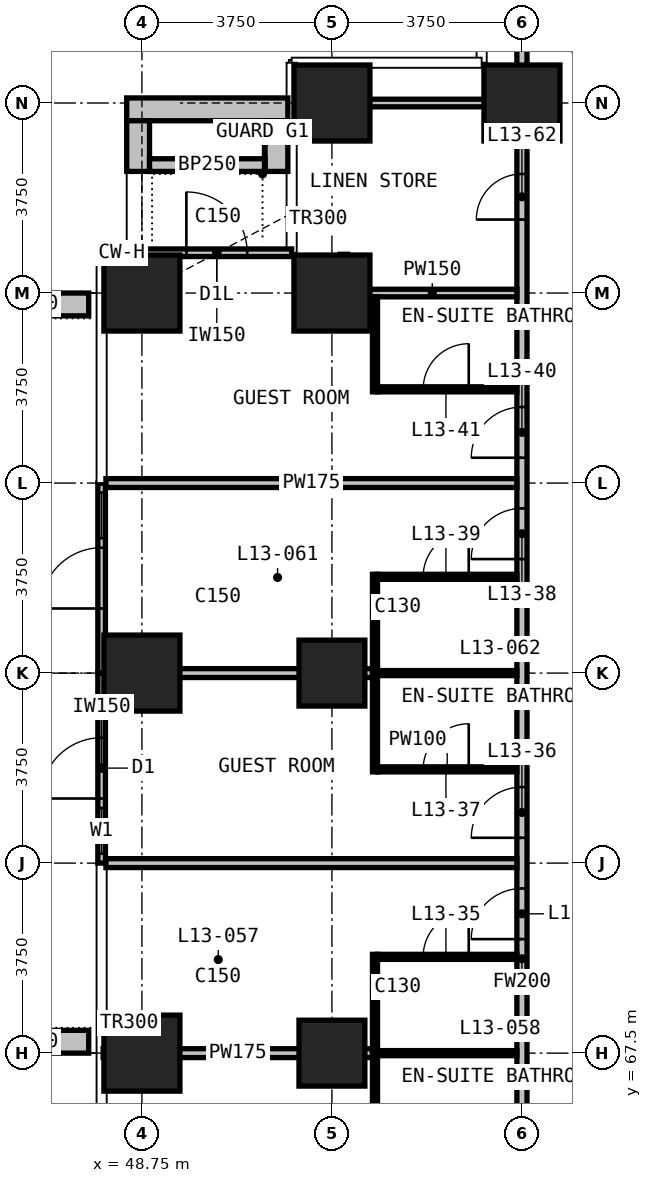
"""IFC4 building model, lengths in metres.
Left out: names, types, materials, properties, quantities, classifications, styles, units other than length and angle.
Written with IfcOpenShell. Run it as: python <this file> out.ifc"""

import sys

from ifc_helpers import new_model, si_unit, direction, frame, frame_2d, origin, origin_2d, place, context, subcontext, project, spatial, rectangle, extrude, element, fill, save


model = new_model("IFC4")
c1 = context("Model", 3, precision=1e-05, world=origin(), true_north=direction((0.0, 1.0)))
c2 = subcontext(c1, "Body", "Model", "MODEL_VIEW")
j1 = project(units=[si_unit("LENGTHUNIT", "METRE"), si_unit("PLANEANGLEUNIT", "RADIAN")], contexts=[c1])
p1 = place(None, origin())
s1 = spatial("IfcSite", under=j1, at=p1, CompositionType="ELEMENT")
p2 = place(p1, origin())
s2 = spatial("IfcBuilding", under=s1, at=p2, CompositionType="ELEMENT")
p3 = place(p2, frame((0.0, 0.0, 62.6)))
s3 = spatial("IfcBuildingStorey", under=s2, at=p3, CompositionType="ELEMENT", Elevation=62.6)
for number, where, z_axis, x_axis in (
    (1, (48.75, 67.5, 0.0), (0.0, 0.0, 1.0), (1.0, 0.0, 0.0)),
    (2, (48.75, 75.0, 0.0), (0.0, 0.0, 1.0), (1.0, 0.0, 0.0)),
    (3, (48.75, 82.5, 0.0), (0.0, 0.0, 1.0), (1.0, 0.0, 0.0)),
):
    element("IfcColumn", number, at=place(p3, frame(where, z_axis=z_axis, x_axis=x_axis)), inside=s3, PredefinedType="COLUMN", context=c2, shape_type="SweptSolid", body=[
        extrude(rectangle(XDim=1.5, YDim=1.5, at=origin_2d()), origin(), (0.0, 0.0, 1.0), 3.3),
    ])
for number, where, z_axis, x_axis in (
    (4, (52.5, 67.5, 0.0), (0.0, 0.0, 1.0), (1.0, 0.0, 0.0)),
    (5, (52.5, 75.0, 0.0), (0.0, 0.0, 1.0), (1.0, 0.0, 0.0)),
):
    element("IfcColumn", number, at=place(p3, frame(where, z_axis=z_axis, x_axis=x_axis)), inside=s3, PredefinedType="COLUMN", context=c2, shape_type="SweptSolid", body=[
        extrude(rectangle(XDim=1.3, YDim=1.3, at=origin_2d()), origin(), (0.0, 0.0, 1.0), 3.3),
    ])
for number, where, z_axis, x_axis in (
    (6, (52.5, 82.5, 0.0), (0.0, 0.0, 1.0), (1.0, 0.0, 0.0)),
    (7, (52.5, 86.25, 0.0), (0.0, 0.0, 1.0), (1.0, 0.0, 0.0)),
    (8, (56.25, 86.25, 0.0), (0.0, 0.0, 1.0), (1.0, 0.0, 0.0)),
):
    element("IfcColumn", number, at=place(p3, frame(where, z_axis=z_axis, x_axis=x_axis)), inside=s3, PredefinedType="COLUMN", context=c2, shape_type="SweptSolid", body=[
        extrude(rectangle(XDim=1.5, YDim=1.5, at=origin_2d()), origin(), (0.0, 0.0, 1.0), 3.3),
    ])
p4 = place(p3, frame((48.75, 83.295, 0.0), z_axis=(0.0, 0.0, 1.0), x_axis=(1.0, 0.0, 0.0)))
e9 = element("IfcWall", 9, at=p4, inside=s3, PredefinedType="SOLIDWALL", context=c2, shape_type="SweptSolid", body=[
    extrude(rectangle(XDim=2.955, YDim=0.15, at=frame_2d((1.478, 0.0))), origin(), (0.0, 0.0, 1.0), 3.0),
])
p5 = place(p4, frame((0.877, 0.0, 0.0)))
e10 = element("IfcOpeningElement", 10, at=p5, cuts=e9, PredefinedType="OPENING", context=c2, shape_type="SweptSolid", body=[
    extrude(rectangle(XDim=1.2, YDim=2.0, at=frame_2d((0.6, 1.0))), frame((0.0, 0.085, 0.0), z_axis=(0.0, -1.0, 0.0), x_axis=(1.0, 0.0, 0.0)), (0.0, 0.0, 1.0), 0.17),
])
p6 = place(p3, frame((47.955, 71.25, 0.0), z_axis=(0.0, 0.0, 1.0), x_axis=(0.0, 1.0, 0.0)))
e11 = element("IfcWall", 11, at=p6, inside=s3, PredefinedType="SOLIDWALL", context=c2, shape_type="SweptSolid", body=[
    extrude(rectangle(XDim=3.75, YDim=0.15, at=frame_2d((1.875, 0.0))), origin(), (0.0, 0.0, 1.0), 3.0),
])
p7 = place(p6, frame((0.188, 0.0, 0.1)))
e12 = element("IfcOpeningElement", 12, at=p7, cuts=e11, PredefinedType="OPENING", context=c2, shape_type="SweptSolid", body=[
    extrude(rectangle(XDim=0.9, YDim=2.4, at=frame_2d((0.45, 1.2))), frame((0.0, 0.085, 0.0), z_axis=(0.0, -1.0, 0.0), x_axis=(1.0, 0.0, 0.0)), (0.0, 0.0, 1.0), 0.17),
])
p8 = place(p6, frame((1.275, 0.0, 0.0)))
e13 = element("IfcOpeningElement", 13, at=p8, cuts=e11, PredefinedType="OPENING", context=c2, shape_type="SweptSolid", body=[
    extrude(rectangle(XDim=1.2, YDim=2.4, at=frame_2d((0.6, 1.2))), frame((0.0, 0.085, 0.0), z_axis=(0.0, -1.0, 0.0), x_axis=(1.0, 0.0, 0.0)), (0.0, 0.0, 1.0), 0.17),
])
p9 = place(p3, frame((47.955, 75.0, 0.0), z_axis=(0.0, 0.0, 1.0), x_axis=(0.0, 1.0, 0.0)))
e14 = element("IfcWall", 14, at=p9, inside=s3, PredefinedType="SOLIDWALL", context=c2, shape_type="SweptSolid", body=[
    extrude(rectangle(XDim=3.75, YDim=0.15, at=frame_2d((1.875, 0.0))), origin(), (0.0, 0.0, 1.0), 3.0),
])
p10 = place(p9, frame((1.275, 0.0, 0.0)))
e15 = element("IfcOpeningElement", 15, at=p10, cuts=e14, PredefinedType="OPENING", context=c2, shape_type="SweptSolid", body=[
    extrude(rectangle(XDim=1.2, YDim=2.4, at=frame_2d((0.6, 1.2))), frame((0.0, 0.085, 0.0), z_axis=(0.0, -1.0, 0.0), x_axis=(1.0, 0.0, 0.0)), (0.0, 0.0, 1.0), 0.17),
])
p11 = place(p9, frame((2.663, 0.0, 0.1)))
e16 = element("IfcOpeningElement", 16, at=p11, cuts=e14, PredefinedType="OPENING", context=c2, shape_type="SweptSolid", body=[
    extrude(rectangle(XDim=0.9, YDim=2.4, at=frame_2d((0.45, 1.2))), frame((0.0, 0.085, 0.0), z_axis=(0.0, -1.0, 0.0), x_axis=(1.0, 0.0, 0.0)), (0.0, 0.0, 1.0), 0.17),
])
p12 = place(p3, frame((48.45, 86.125, 0.0), z_axis=(0.0, 0.0, 1.0), x_axis=(1.0, 0.0, 0.0)))
e17 = element("IfcWall", 17, at=p12, inside=s3, PredefinedType="USERDEFINED", context=c2, shape_type="SweptSolid", body=[
    extrude(rectangle(XDim=3.18, YDim=0.45, at=frame_2d((1.59, 0.0))), origin(), (0.0, 0.0, 1.0), 1.1),
])
for number, where, z_axis, x_axis in (
    (18, (48.675, 84.9, 0.0), (0.0, 0.0, 1.0), (0.0, 1.0, 0.0)),
    (19, (51.405, 84.9, 0.0), (0.0, 0.0, 1.0), (0.0, 1.0, 0.0)),
):
    element("IfcWall", number, at=place(p3, frame(where, z_axis=z_axis, x_axis=x_axis)), inside=s3, PredefinedType="USERDEFINED", context=c2, shape_type="SweptSolid", body=[
        extrude(rectangle(XDim=1.0, YDim=0.45, at=frame_2d((0.5, 0.0))), origin(), (0.0, 0.0, 1.0), 1.1),
    ])
p13 = place(p3, frame((48.9, 85.025, 0.0), z_axis=(0.0, 0.0, 1.0), x_axis=(1.0, 0.0, 0.0)))
e20 = element("IfcWall", 20, at=p13, inside=s3, PredefinedType="USERDEFINED", context=c2, shape_type="SweptSolid", body=[
    extrude(rectangle(XDim=2.28, YDim=0.25, at=frame_2d((1.14, 0.0))), origin(), (0.0, 0.0, 1.0), 1.0),
])
for number, where, z_axis, x_axis in (
    (21, (47.7, 67.725, 0.0), (0.0, 0.0, 1.0), (-1.0, 0.0, 0.0)),
    (22, (47.7, 82.275, 0.0), (0.0, 0.0, 1.0), (-1.0, 0.0, 0.0)),
):
    element("IfcWall", number, at=place(p3, frame(where, z_axis=z_axis, x_axis=x_axis)), inside=s3, PredefinedType="USERDEFINED", context=c2, shape_type="SweptSolid", body=[
        extrude(rectangle(XDim=2.35, YDim=0.45, at=frame_2d((1.175, 0.0))), origin(), (0.0, 0.0, 1.0), 1.1),
    ])
p14 = place(p3, frame((56.25, 52.4, 0.0), z_axis=(0.0, 0.0, 1.0), x_axis=(0.0, 1.0, 0.0)))
e23 = element("IfcWall", 23, at=p14, inside=s3, PredefinedType="PARTITIONING", context=c2, shape_type="SweptSolid", body=[
    extrude(rectangle(XDim=33.925, YDim=0.2, at=frame_2d((16.962, 0.0))), origin(), (0.0, 0.0, 1.0), 3.0),
])
p15 = place(p14, frame((2.35, 0.0, 0.0)))
e24 = element("IfcOpeningElement", 24, at=p15, cuts=e23, PredefinedType="OPENING", context=c2, shape_type="SweptSolid", body=[
    extrude(rectangle(XDim=1.0, YDim=2.2, at=frame_2d((0.5, 1.1))), frame((0.0, 0.11, 0.0), z_axis=(0.0, -1.0, 0.0), x_axis=(1.0, 0.0, 0.0)), (0.0, 0.0, 1.0), 0.22),
])
p16 = place(p14, frame((4.35, 0.0, 0.0)))
e25 = element("IfcOpeningElement", 25, at=p16, cuts=e23, PredefinedType="OPENING", context=c2, shape_type="SweptSolid", body=[
    extrude(rectangle(XDim=1.0, YDim=2.2, at=frame_2d((0.5, 1.1))), frame((0.0, 0.11, 0.0), z_axis=(0.0, -1.0, 0.0), x_axis=(1.0, 0.0, 0.0)), (0.0, 0.0, 1.0), 0.22),
])
p17 = place(p14, frame((9.85, 0.0, 0.0)))
e26 = element("IfcOpeningElement", 26, at=p17, cuts=e23, PredefinedType="OPENING", context=c2, shape_type="SweptSolid", body=[
    extrude(rectangle(XDim=1.0, YDim=2.2, at=frame_2d((0.5, 1.1))), frame((0.0, 0.11, 0.0), z_axis=(0.0, -1.0, 0.0), x_axis=(1.0, 0.0, 0.0)), (0.0, 0.0, 1.0), 0.22),
])
p18 = place(p14, frame((11.85, 0.0, 0.0)))
e27 = element("IfcOpeningElement", 27, at=p18, cuts=e23, PredefinedType="OPENING", context=c2, shape_type="SweptSolid", body=[
    extrude(rectangle(XDim=1.0, YDim=2.2, at=frame_2d((0.5, 1.1))), frame((0.0, 0.11, 0.0), z_axis=(0.0, -1.0, 0.0), x_axis=(1.0, 0.0, 0.0)), (0.0, 0.0, 1.0), 0.22),
])
p19 = place(p14, frame((17.35, 0.0, 0.0)))
e28 = element("IfcOpeningElement", 28, at=p19, cuts=e23, PredefinedType="OPENING", context=c2, shape_type="SweptSolid", body=[
    extrude(rectangle(XDim=1.0, YDim=2.2, at=frame_2d((0.5, 1.1))), frame((0.0, 0.11, 0.0), z_axis=(0.0, -1.0, 0.0), x_axis=(1.0, 0.0, 0.0)), (0.0, 0.0, 1.0), 0.22),
])
p20 = place(p14, frame((19.35, 0.0, 0.0)))
e29 = element("IfcOpeningElement", 29, at=p20, cuts=e23, PredefinedType="OPENING", context=c2, shape_type="SweptSolid", body=[
    extrude(rectangle(XDim=1.0, YDim=2.2, at=frame_2d((0.5, 1.1))), frame((0.0, 0.11, 0.0), z_axis=(0.0, -1.0, 0.0), x_axis=(1.0, 0.0, 0.0)), (0.0, 0.0, 1.0), 0.22),
])
p21 = place(p14, frame((24.85, 0.0, 0.0)))
e30 = element("IfcOpeningElement", 30, at=p21, cuts=e23, PredefinedType="OPENING", context=c2, shape_type="SweptSolid", body=[
    extrude(rectangle(XDim=1.0, YDim=2.2, at=frame_2d((0.5, 1.1))), frame((0.0, 0.11, 0.0), z_axis=(0.0, -1.0, 0.0), x_axis=(1.0, 0.0, 0.0)), (0.0, 0.0, 1.0), 0.22),
])
p22 = place(p14, frame((26.85, 0.0, 0.0)))
e31 = element("IfcOpeningElement", 31, at=p22, cuts=e23, PredefinedType="OPENING", context=c2, shape_type="SweptSolid", body=[
    extrude(rectangle(XDim=1.0, YDim=2.2, at=frame_2d((0.5, 1.1))), frame((0.0, 0.11, 0.0), z_axis=(0.0, -1.0, 0.0), x_axis=(1.0, 0.0, 0.0)), (0.0, 0.0, 1.0), 0.22),
])
p23 = place(p14, frame((31.55, 0.0, 0.0)))
e32 = element("IfcOpeningElement", 32, at=p23, cuts=e23, PredefinedType="OPENING", context=c2, shape_type="SweptSolid", body=[
    extrude(rectangle(XDim=0.9, YDim=2.2, at=frame_2d((0.45, 1.1))), frame((0.0, 0.11, 0.0), z_axis=(0.0, -1.0, 0.0), x_axis=(1.0, 0.0, 0.0)), (0.0, 0.0, 1.0), 0.22),
])
p24 = place(p3, frame((56.25, 86.28, 0.0), z_axis=(0.0, 0.0, 1.0), x_axis=(0.0, 1.0, 0.0)))
e33 = element("IfcWall", 33, at=p24, inside=s3, PredefinedType="PARTITIONING", context=c2, shape_type="SweptSolid", body=[
    extrude(rectangle(XDim=4.365, YDim=0.2, at=frame_2d((2.183, 0.0))), origin(), (0.0, 0.0, 1.0), 3.0),
])
p25 = place(p3, frame((47.985, 67.5, 0.0), z_axis=(0.0, 0.0, 1.0), x_axis=(1.0, 0.0, 0.0)))
e34 = element("IfcWall", 34, at=p25, inside=s3, PredefinedType="PARTITIONING", context=c2, shape_type="SweptSolid", body=[
    extrude(rectangle(XDim=5.315, YDim=0.175, at=frame_2d((2.657, 0.0))), origin(), (0.0, 0.0, 1.0), 3.0),
])
p26 = place(p3, frame((48.04, 71.25, 0.0), z_axis=(0.0, 0.0, 1.0), x_axis=(1.0, 0.0, 0.0)))
e35 = element("IfcWall", 35, at=p26, inside=s3, PredefinedType="PARTITIONING", context=c2, shape_type="SweptSolid", body=[
    extrude(rectangle(XDim=8.11, YDim=0.175, at=frame_2d((4.055, 0.0))), origin(), (0.0, 0.0, 1.0), 3.0),
])
p27 = place(p3, frame((48.04, 75.0, 0.0), z_axis=(0.0, 0.0, 1.0), x_axis=(1.0, 0.0, 0.0)))
e36 = element("IfcWall", 36, at=p27, inside=s3, PredefinedType="PARTITIONING", context=c2, shape_type="SweptSolid", body=[
    extrude(rectangle(XDim=5.26, YDim=0.175, at=frame_2d((2.63, 0.0))), origin(), (0.0, 0.0, 1.0), 3.0),
])
p28 = place(p3, frame((48.04, 78.75, 0.0), z_axis=(0.0, 0.0, 1.0), x_axis=(1.0, 0.0, 0.0)))
e37 = element("IfcWall", 37, at=p28, inside=s3, PredefinedType="PARTITIONING", context=c2, shape_type="SweptSolid", body=[
    extrude(rectangle(XDim=8.11, YDim=0.175, at=frame_2d((4.055, 0.0))), origin(), (0.0, 0.0, 1.0), 3.0),
])
p29 = place(p3, frame((52.81, 82.5, 0.0), z_axis=(0.0, 0.0, 1.0), x_axis=(1.0, 0.0, 0.0)))
e38 = element("IfcWall", 38, at=p29, inside=s3, PredefinedType="PARTITIONING", context=c2, shape_type="SweptSolid", body=[
    extrude(rectangle(XDim=3.34, YDim=0.15, at=frame_2d((1.67, 0.0))), origin(), (0.0, 0.0, 1.0), 3.0),
])
p30 = place(p3, frame((51.855, 86.25, 0.0), z_axis=(0.0, 0.0, 1.0), x_axis=(1.0, 0.0, 0.0)))
e39 = element("IfcWall", 39, at=p30, inside=s3, PredefinedType="PARTITIONING", context=c2, shape_type="SweptSolid", body=[
    extrude(rectangle(XDim=4.295, YDim=0.15, at=frame_2d((2.147, 0.0))), origin(), (0.0, 0.0, 1.0), 3.0),
])
p31 = place(p3, frame((52.735, 82.425, 0.0), z_axis=(0.0, 0.0, 1.0), x_axis=(0.0, 1.0, 0.0)))
e40 = element("IfcWall", 40, at=p31, inside=s3, PredefinedType="PARTITIONING", context=c2, shape_type="SweptSolid", body=[
    extrude(rectangle(XDim=0.84, YDim=0.15, at=frame_2d((0.42, 0.0))), origin(), (0.0, 0.0, 1.0), 3.0),
])
p32 = place(p3, frame((53.4, 67.5, 0.0), z_axis=(0.0, 0.0, 1.0), x_axis=(1.0, 0.0, 0.0)))
e41 = element("IfcWall", 41, at=p32, inside=s3, PredefinedType="PARTITIONING", context=c2, shape_type="SweptSolid", body=[
    extrude(rectangle(XDim=2.75, YDim=0.1, at=frame_2d((1.375, 0.0))), origin(), (0.0, 0.0, 1.0), 3.0),
])
p33 = place(p3, frame((53.4, 69.4, 0.0), z_axis=(0.0, 0.0, 1.0), x_axis=(1.0, 0.0, 0.0)))
e42 = element("IfcWall", 42, at=p33, inside=s3, PredefinedType="PARTITIONING", context=c2, shape_type="SweptSolid", body=[
    extrude(rectangle(XDim=2.75, YDim=0.1, at=frame_2d((1.375, 0.0))), origin(), (0.0, 0.0, 1.0), 3.0),
])
p34 = place(p33, frame((0.9, 0.0, 0.0)))
e43 = element("IfcOpeningElement", 43, at=p34, cuts=e42, PredefinedType="OPENING", context=c2, shape_type="SweptSolid", body=[
    extrude(rectangle(XDim=0.9, YDim=2.2, at=frame_2d((0.45, 1.1))), frame((0.0, 0.06, 0.0), z_axis=(0.0, -1.0, 0.0), x_axis=(1.0, 0.0, 0.0)), (0.0, 0.0, 1.0), 0.12),
])
p35 = place(p3, frame((53.4, 73.1, 0.0), z_axis=(0.0, 0.0, 1.0), x_axis=(1.0, 0.0, 0.0)))
e44 = element("IfcWall", 44, at=p35, inside=s3, PredefinedType="PARTITIONING", context=c2, shape_type="SweptSolid", body=[
    extrude(rectangle(XDim=2.75, YDim=0.1, at=frame_2d((1.375, 0.0))), origin(), (0.0, 0.0, 1.0), 3.0),
])
p36 = place(p35, frame((0.9, 0.0, 0.0)))
e45 = element("IfcOpeningElement", 45, at=p36, cuts=e44, PredefinedType="OPENING", context=c2, shape_type="SweptSolid", body=[
    extrude(rectangle(XDim=0.9, YDim=2.2, at=frame_2d((0.45, 1.1))), frame((0.0, 0.06, 0.0), z_axis=(0.0, -1.0, 0.0), x_axis=(1.0, 0.0, 0.0)), (0.0, 0.0, 1.0), 0.12),
])
p37 = place(p3, frame((53.4, 75.0, 0.0), z_axis=(0.0, 0.0, 1.0), x_axis=(1.0, 0.0, 0.0)))
e46 = element("IfcWall", 46, at=p37, inside=s3, PredefinedType="PARTITIONING", context=c2, shape_type="SweptSolid", body=[
    extrude(rectangle(XDim=2.75, YDim=0.1, at=frame_2d((1.375, 0.0))), origin(), (0.0, 0.0, 1.0), 3.0),
])
p38 = place(p3, frame((53.4, 76.9, 0.0), z_axis=(0.0, 0.0, 1.0), x_axis=(1.0, 0.0, 0.0)))
e47 = element("IfcWall", 47, at=p38, inside=s3, PredefinedType="PARTITIONING", context=c2, shape_type="SweptSolid", body=[
    extrude(rectangle(XDim=2.75, YDim=0.1, at=frame_2d((1.375, 0.0))), origin(), (0.0, 0.0, 1.0), 3.0),
])
p39 = place(p38, frame((0.9, 0.0, 0.0)))
e48 = element("IfcOpeningElement", 48, at=p39, cuts=e47, PredefinedType="OPENING", context=c2, shape_type="SweptSolid", body=[
    extrude(rectangle(XDim=0.9, YDim=2.2, at=frame_2d((0.45, 1.1))), frame((0.0, 0.06, 0.0), z_axis=(0.0, -1.0, 0.0), x_axis=(1.0, 0.0, 0.0)), (0.0, 0.0, 1.0), 0.12),
])
p40 = place(p3, frame((53.4, 80.6, 0.0), z_axis=(0.0, 0.0, 1.0), x_axis=(1.0, 0.0, 0.0)))
e49 = element("IfcWall", 49, at=p40, inside=s3, PredefinedType="PARTITIONING", context=c2, shape_type="SweptSolid", body=[
    extrude(rectangle(XDim=2.75, YDim=0.1, at=frame_2d((1.375, 0.0))), origin(), (0.0, 0.0, 1.0), 3.0),
])
p41 = place(p40, frame((0.9, 0.0, 0.0)))
e50 = element("IfcOpeningElement", 50, at=p41, cuts=e49, PredefinedType="OPENING", context=c2, shape_type="SweptSolid", body=[
    extrude(rectangle(XDim=0.9, YDim=2.2, at=frame_2d((0.45, 1.1))), frame((0.0, 0.06, 0.0), z_axis=(0.0, -1.0, 0.0), x_axis=(1.0, 0.0, 0.0)), (0.0, 0.0, 1.0), 0.12),
])
for number, where, z_axis, x_axis in (
    (51, (53.35, 65.55, 0.0), (0.0, 0.0, 1.0), (0.0, 1.0, 0.0)),
    (52, (53.35, 73.05, 0.0), (0.0, 0.0, 1.0), (0.0, 1.0, 0.0)),
):
    element("IfcWall", number, at=place(p3, frame(where, z_axis=z_axis, x_axis=x_axis)), inside=s3, PredefinedType="PARTITIONING", context=c2, shape_type="SweptSolid", body=[
        extrude(rectangle(XDim=3.9, YDim=0.1, at=frame_2d((1.95, 0.0))), origin(), (0.0, 0.0, 1.0), 3.0),
    ])
p42 = place(p3, frame((53.35, 80.55, 0.0), z_axis=(0.0, 0.0, 1.0), x_axis=(0.0, 1.0, 0.0)))
e53 = element("IfcWall", 53, at=p42, inside=s3, PredefinedType="PARTITIONING", context=c2, shape_type="SweptSolid", body=[
    extrude(rectangle(XDim=1.875, YDim=0.1, at=frame_2d((0.938, 0.0))), origin(), (0.0, 0.0, 1.0), 3.0),
])
p43 = place(p5, origin())
e54 = element("IfcDoor", 54, at=p43, inside=s3, OperationType="SINGLE_SWING_LEFT", PredefinedType="DOOR", context=c2, shape_type="SweptSolid", body=[
    extrude(rectangle(XDim=1.2, YDim=2.0, at=frame_2d((0.6, 1.0))), frame((0.0, 0.025, 0.0), z_axis=(0.0, -1.0, 0.0), x_axis=(1.0, 0.0, 0.0)), (0.0, 0.0, 1.0), 0.05),
])
fill(e10, e54)
p44 = place(p7, origin())
e55 = element("IfcWindow", 55, at=p44, inside=s3, PartitioningType="SINGLE_PANEL", PredefinedType="WINDOW", context=c2, shape_type="SweptSolid", body=[
    extrude(rectangle(XDim=0.9, YDim=2.4, at=frame_2d((0.45, 1.2))), frame((0.0, 0.03, 0.0), z_axis=(0.0, -1.0, 0.0), x_axis=(1.0, 0.0, 0.0)), (0.0, 0.0, 1.0), 0.06),
])
fill(e12, e55)
p45 = place(p8, origin())
e56 = element("IfcDoor", 56, at=p45, inside=s3, OperationType="SINGLE_SWING_LEFT", PredefinedType="DOOR", context=c2, shape_type="SweptSolid", body=[
    extrude(rectangle(XDim=1.2, YDim=2.4, at=frame_2d((0.6, 1.2))), frame((0.0, 0.025, 0.0), z_axis=(0.0, -1.0, 0.0), x_axis=(1.0, 0.0, 0.0)), (0.0, 0.0, 1.0), 0.05),
])
fill(e13, e56)
p46 = place(p10, origin())
e57 = element("IfcDoor", 57, at=p46, inside=s3, OperationType="SINGLE_SWING_LEFT", PredefinedType="DOOR", context=c2, shape_type="SweptSolid", body=[
    extrude(rectangle(XDim=1.2, YDim=2.4, at=frame_2d((0.6, 1.2))), frame((0.0, 0.025, 0.0), z_axis=(0.0, -1.0, 0.0), x_axis=(1.0, 0.0, 0.0)), (0.0, 0.0, 1.0), 0.05),
])
fill(e15, e57)
p47 = place(p11, origin())
e58 = element("IfcWindow", 58, at=p47, inside=s3, PartitioningType="SINGLE_PANEL", PredefinedType="WINDOW", context=c2, shape_type="SweptSolid", body=[
    extrude(rectangle(XDim=0.9, YDim=2.4, at=frame_2d((0.45, 1.2))), frame((0.0, 0.03, 0.0), z_axis=(0.0, -1.0, 0.0), x_axis=(1.0, 0.0, 0.0)), (0.0, 0.0, 1.0), 0.06),
])
fill(e16, e58)
p48 = place(p19, origin())
e59 = element("IfcDoor", 59, at=p48, inside=s3, OperationType="SINGLE_SWING_RIGHT", PredefinedType="DOOR", context=c2, shape_type="SweptSolid", body=[
    extrude(rectangle(XDim=1.0, YDim=2.2, at=frame_2d((0.5, 1.1))), frame((0.0, 0.025, 0.0), z_axis=(0.0, -1.0, 0.0), x_axis=(1.0, 0.0, 0.0)), (0.0, 0.0, 1.0), 0.05),
])
fill(e28, e59)
p49 = place(p34, origin())
e60 = element("IfcDoor", 60, at=p49, inside=s3, OperationType="SINGLE_SWING_RIGHT", PredefinedType="DOOR", context=c2, shape_type="SweptSolid", body=[
    extrude(rectangle(XDim=0.9, YDim=2.2, at=frame_2d((0.45, 1.1))), frame((0.0, 0.025, 0.0), z_axis=(0.0, -1.0, 0.0), x_axis=(1.0, 0.0, 0.0)), (0.0, 0.0, 1.0), 0.05),
])
fill(e43, e60)
p50 = place(p20, origin())
e61 = element("IfcDoor", 61, at=p50, inside=s3, OperationType="SINGLE_SWING_LEFT", PredefinedType="DOOR", context=c2, shape_type="SweptSolid", body=[
    extrude(rectangle(XDim=1.0, YDim=2.2, at=frame_2d((0.5, 1.1))), frame((0.0, 0.025, 0.0), z_axis=(0.0, -1.0, 0.0), x_axis=(1.0, 0.0, 0.0)), (0.0, 0.0, 1.0), 0.05),
])
fill(e29, e61)
p51 = place(p36, origin())
e62 = element("IfcDoor", 62, at=p51, inside=s3, OperationType="SINGLE_SWING_RIGHT", PredefinedType="DOOR", context=c2, shape_type="SweptSolid", body=[
    extrude(rectangle(XDim=0.9, YDim=2.2, at=frame_2d((0.45, 1.1))), frame((0.0, 0.025, 0.0), z_axis=(0.0, -1.0, 0.0), x_axis=(1.0, 0.0, 0.0)), (0.0, 0.0, 1.0), 0.05),
])
fill(e45, e62)
p52 = place(p21, origin())
e63 = element("IfcDoor", 63, at=p52, inside=s3, OperationType="SINGLE_SWING_RIGHT", PredefinedType="DOOR", context=c2, shape_type="SweptSolid", body=[
    extrude(rectangle(XDim=1.0, YDim=2.2, at=frame_2d((0.5, 1.1))), frame((0.0, 0.025, 0.0), z_axis=(0.0, -1.0, 0.0), x_axis=(1.0, 0.0, 0.0)), (0.0, 0.0, 1.0), 0.05),
])
fill(e30, e63)
p53 = place(p39, origin())
e64 = element("IfcDoor", 64, at=p53, inside=s3, OperationType="SINGLE_SWING_RIGHT", PredefinedType="DOOR", context=c2, shape_type="SweptSolid", body=[
    extrude(rectangle(XDim=0.9, YDim=2.2, at=frame_2d((0.45, 1.1))), frame((0.0, 0.025, 0.0), z_axis=(0.0, -1.0, 0.0), x_axis=(1.0, 0.0, 0.0)), (0.0, 0.0, 1.0), 0.05),
])
fill(e48, e64)
p54 = place(p22, origin())
e65 = element("IfcDoor", 65, at=p54, inside=s3, OperationType="SINGLE_SWING_LEFT", PredefinedType="DOOR", context=c2, shape_type="SweptSolid", body=[
    extrude(rectangle(XDim=1.0, YDim=2.2, at=frame_2d((0.5, 1.1))), frame((0.0, 0.025, 0.0), z_axis=(0.0, -1.0, 0.0), x_axis=(1.0, 0.0, 0.0)), (0.0, 0.0, 1.0), 0.05),
])
fill(e31, e65)
p55 = place(p41, origin())
e66 = element("IfcDoor", 66, at=p55, inside=s3, OperationType="SINGLE_SWING_RIGHT", PredefinedType="DOOR", context=c2, shape_type="SweptSolid", body=[
    extrude(rectangle(XDim=0.9, YDim=2.2, at=frame_2d((0.45, 1.1))), frame((0.0, 0.025, 0.0), z_axis=(0.0, -1.0, 0.0), x_axis=(1.0, 0.0, 0.0)), (0.0, 0.0, 1.0), 0.05),
])
fill(e50, e66)
p56 = place(p23, origin())
e67 = element("IfcDoor", 67, at=p56, inside=s3, OperationType="SINGLE_SWING_RIGHT", PredefinedType="DOOR", context=c2, shape_type="SweptSolid", body=[
    extrude(rectangle(XDim=0.9, YDim=2.2, at=frame_2d((0.45, 1.1))), frame((0.0, 0.025, 0.0), z_axis=(0.0, -1.0, 0.0), x_axis=(1.0, 0.0, 0.0)), (0.0, 0.0, 1.0), 0.05),
])
fill(e32, e67)
save(model, sys.argv[1])
